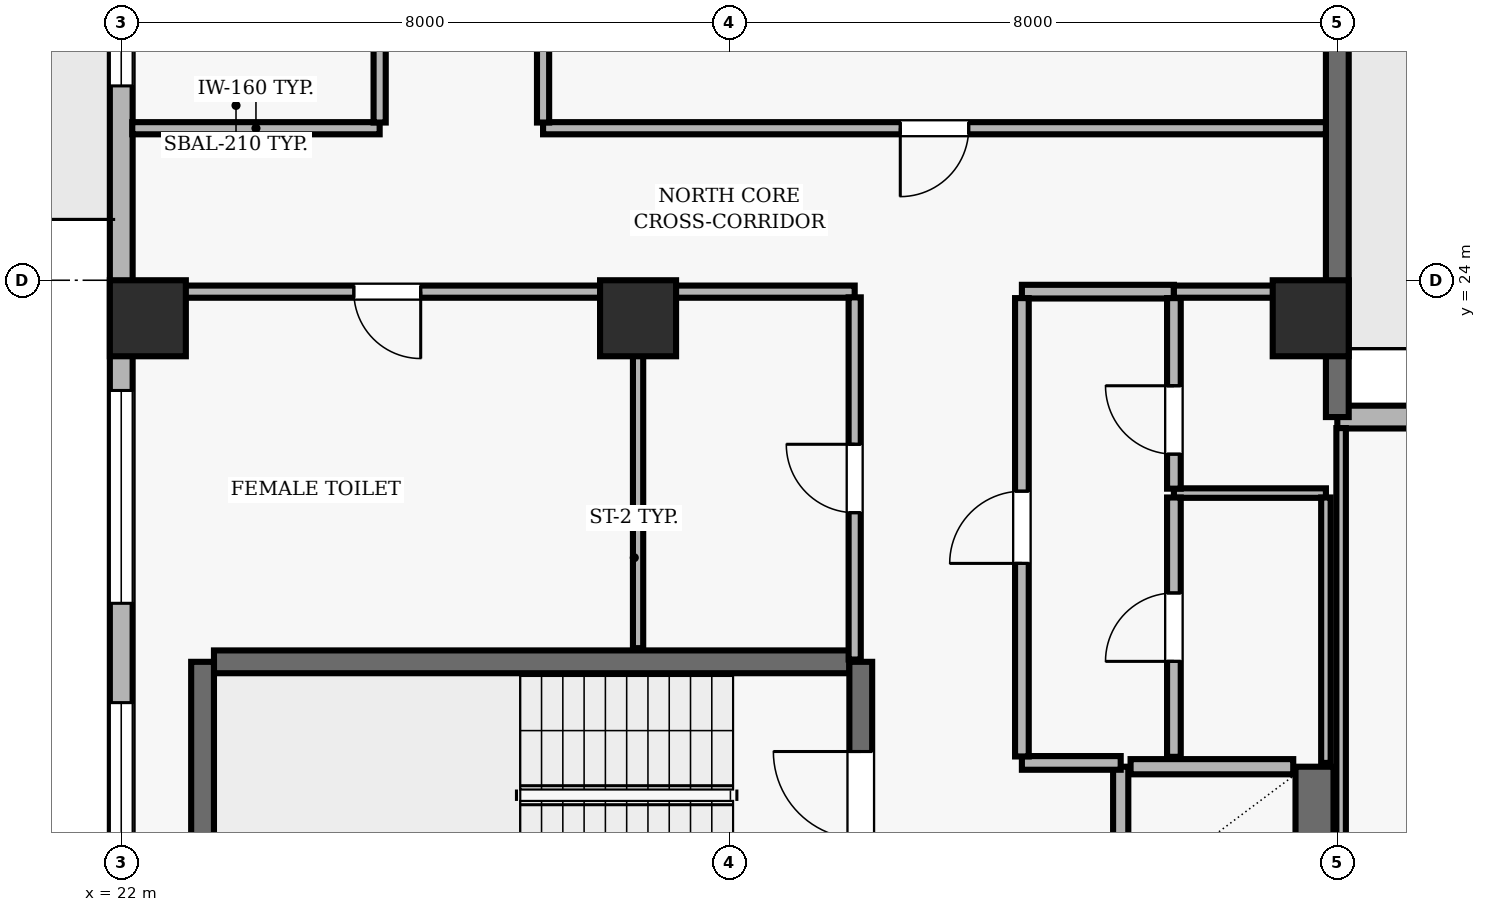
"""IFC4 building model, lengths in metres.
Left out: names, types, materials, properties, quantities, classifications, styles, units other than length and angle.
Written with IfcOpenShell. Run it as: python <this file> out.ifc"""

import sys

from ifc_helpers import new_model, si_unit, direction, frame, frame_2d, origin, origin_2d, place, context, subcontext, project, spatial, rectangle, extrude, element, fill, save


model = new_model("IFC4")
c1 = context("Model", 3, precision=1e-05, world=origin(), true_north=direction((0.0, 1.0)))
c2 = subcontext(c1, "Body", "Model", "MODEL_VIEW")
j1 = project(units=[si_unit("LENGTHUNIT", "METRE"), si_unit("PLANEANGLEUNIT", "RADIAN")], contexts=[c1])
p1 = place(None, origin())
s1 = spatial("IfcSite", under=j1, at=p1, CompositionType="ELEMENT")
p2 = place(p1, origin())
s2 = spatial("IfcBuilding", under=s1, at=p2, CompositionType="ELEMENT")
p3 = place(p2, frame((0.0, 0.0, 230.4)))
s3 = spatial("IfcBuildingStorey", under=s2, at=p3, CompositionType="ELEMENT", Elevation=230.4)
for number, where, z_axis, x_axis in (
    (1, (22.35, 23.5, 0.0), (0.0, 0.0, 1.0), (1.0, 0.0, 0.0)),
    (2, (28.8, 23.5, 0.0), (0.0, 0.0, 1.0), (1.0, 0.0, 0.0)),
    (3, (37.65, 23.5, 0.0), (0.0, 0.0, 1.0), (1.0, 0.0, 0.0)),
):
    element("IfcColumn", number, at=place(p3, frame(where, z_axis=z_axis, x_axis=x_axis)), inside=s3, PredefinedType="COLUMN", context=c2, shape_type="SweptSolid", body=[
        extrude(rectangle(XDim=1.0, YDim=1.0, at=origin_2d()), origin(), (0.0, 0.0, 1.0), 3.9),
    ])
p4 = place(p3, frame((42.4, 22.2, 0.0), z_axis=(0.0, 0.0, 1.0), x_axis=(-1.0, 0.0, 0.0)))
e4 = element("IfcWall", 4, at=p4, inside=s3, PredefinedType="SOLIDWALL", context=c2, shape_type="SweptSolid", body=[
    extrude(rectangle(XDim=4.4, YDim=0.3, at=frame_2d((2.2, 0.0))), origin(), (0.0, 0.0, 1.0), 3.69),
])
p5 = place(p3, frame((38.0, 22.2, 0.0), z_axis=(0.0, 0.0, 1.0), x_axis=(0.0, 1.0, 0.0)))
e5 = element("IfcWall", 5, at=p5, inside=s3, PredefinedType="SOLIDWALL", context=c2, shape_type="SweptSolid", body=[
    extrude(rectangle(XDim=18.5, YDim=0.3, at=frame_2d((9.25, 0.0))), origin(), (0.0, 0.0, 1.0), 3.69),
])
p6 = place(p5, frame((11.05, 0.0, 0.0)))
e6 = element("IfcOpeningElement", 6, at=p6, cuts=e5, PredefinedType="OPENING", context=c2, shape_type="SweptSolid", body=[
    extrude(rectangle(XDim=1.0, YDim=2.2, at=frame_2d((0.5, 1.1))), frame((0.0, 0.16, 0.0), z_axis=(0.0, -1.0, 0.0), x_axis=(1.0, 0.0, 0.0)), (0.0, 0.0, 1.0), 0.32),
])
p7 = place(p3, frame((22.0, 40.7, 0.0), z_axis=(0.0, 0.0, 1.0), x_axis=(0.0, -1.0, 0.0)))
e7 = element("IfcWall", 7, at=p7, inside=s3, PredefinedType="SOLIDWALL", context=c2, shape_type="SweptSolid", body=[
    extrude(rectangle(XDim=38.2, YDim=0.3, at=frame_2d((19.1, 0.0))), origin(), (0.0, 0.0, 1.0), 3.69),
])
p8 = place(p7, frame((6.7, 0.0, 0.0)))
e8 = element("IfcOpeningElement", 8, at=p8, cuts=e7, PredefinedType="OPENING", context=c2, shape_type="SweptSolid", body=[
    extrude(rectangle(XDim=1.0, YDim=2.2, at=frame_2d((0.5, 1.1))), frame((0.0, 0.16, 0.0), z_axis=(0.0, -1.0, 0.0), x_axis=(1.0, 0.0, 0.0)), (0.0, 0.0, 1.0), 0.32),
])
p9 = place(p7, frame((11.343, 0.0, 0.9)))
e9 = element("IfcOpeningElement", 9, at=p9, cuts=e7, PredefinedType="OPENING", context=c2, shape_type="SweptSolid", body=[
    extrude(rectangle(XDim=2.8, YDim=1.8, at=frame_2d((1.4, 0.9))), frame((0.0, 0.16, 0.0), z_axis=(0.0, -1.0, 0.0), x_axis=(1.0, 0.0, 0.0)), (0.0, 0.0, 1.0), 0.32),
])
p10 = place(p7, frame((18.15, 0.0, 0.9)))
e10 = element("IfcOpeningElement", 10, at=p10, cuts=e7, PredefinedType="OPENING", context=c2, shape_type="SweptSolid", body=[
    extrude(rectangle(XDim=2.8, YDim=1.8, at=frame_2d((1.4, 0.9))), frame((0.0, 0.16, 0.0), z_axis=(0.0, -1.0, 0.0), x_axis=(1.0, 0.0, 0.0)), (0.0, 0.0, 1.0), 0.32),
])
p11 = place(p7, frame((22.257, 0.0, 0.9)))
e11 = element("IfcOpeningElement", 11, at=p11, cuts=e7, PredefinedType="OPENING", context=c2, shape_type="SweptSolid", body=[
    extrude(rectangle(XDim=2.8, YDim=1.8, at=frame_2d((1.4, 0.9))), frame((0.0, 0.16, 0.0), z_axis=(0.0, -1.0, 0.0), x_axis=(1.0, 0.0, 0.0)), (0.0, 0.0, 1.0), 0.32),
])
p12 = place(p7, frame((28.614, 0.0, 0.9)))
e12 = element("IfcOpeningElement", 12, at=p12, cuts=e7, PredefinedType="OPENING", context=c2, shape_type="SweptSolid", body=[
    extrude(rectangle(XDim=2.8, YDim=1.8, at=frame_2d((1.4, 0.9))), frame((0.0, 0.16, 0.0), z_axis=(0.0, -1.0, 0.0), x_axis=(1.0, 0.0, 0.0)), (0.0, 0.0, 1.0), 0.32),
])
p13 = place(p3, frame((31.58, 18.98, 0.0), z_axis=(0.0, 0.0, 1.0), x_axis=(-1.0, 0.0, 0.0)))
e13 = element("IfcWall", 13, at=p13, inside=s3, PredefinedType="SHEAR", context=c2, shape_type="SweptSolid", body=[
    extrude(rectangle(XDim=8.36, YDim=0.3, at=frame_2d((4.18, 0.0))), origin(), (0.0, 0.0, 1.0), 3.69),
])
p14 = place(p3, frame((23.07, 18.98, 0.0), z_axis=(0.0, 0.0, 1.0), x_axis=(0.0, -1.0, 0.0)))
e14 = element("IfcWall", 14, at=p14, inside=s3, PredefinedType="SHEAR", context=c2, shape_type="SweptSolid", body=[
    extrude(rectangle(XDim=3.51, YDim=0.3, at=frame_2d((1.755, 0.0))), origin(), (0.0, 0.0, 1.0), 3.69),
])
p15 = place(p3, frame((31.73, 15.47, 0.0), z_axis=(0.0, 0.0, 1.0), x_axis=(0.0, 1.0, 0.0)))
e15 = element("IfcWall", 15, at=p15, inside=s3, PredefinedType="SHEAR", context=c2, shape_type="SweptSolid", body=[
    extrude(rectangle(XDim=3.51, YDim=0.3, at=frame_2d((1.755, 0.0))), origin(), (0.0, 0.0, 1.0), 3.69),
])
p16 = place(p15, frame((1.18, 0.0, 0.0)))
e16 = element("IfcOpeningElement", 16, at=p16, cuts=e15, PredefinedType="OPENING", context=c2, shape_type="SweptSolid", body=[
    extrude(rectangle(XDim=1.15, YDim=2.15, at=frame_2d((0.575, 1.075))), frame((0.0, 0.16, 0.0), z_axis=(0.0, -1.0, 0.0), x_axis=(1.0, 0.0, 0.0)), (0.0, 0.0, 1.0), 0.32),
])
p17 = place(p3, frame((35.15, 17.6, 0.0), z_axis=(0.0, 0.0, 1.0), x_axis=(0.0, -1.0, 0.0)))
e17 = element("IfcWall", 17, at=p17, inside=s3, PredefinedType="SOLIDWALL", context=c2, shape_type="SweptSolid", body=[
    extrude(rectangle(XDim=1.85, YDim=0.2, at=frame_2d((0.925, 0.0))), origin(), (0.0, 0.0, 1.0), 3.69),
])
p18 = place(p3, frame((37.7, 15.75, 0.0), z_axis=(0.0, 0.0, 1.0), x_axis=(0.0, 1.0, 0.0)))
e18 = element("IfcWall", 18, at=p18, inside=s3, PredefinedType="SHEAR", context=c2, shape_type="SweptSolid", body=[
    extrude(rectangle(XDim=1.85, YDim=0.5, at=frame_2d((0.925, 0.0))), origin(), (0.0, 0.0, 1.0), 3.69),
])
p19 = place(p3, frame((37.42, 17.6, 0.0), z_axis=(0.0, 0.0, 1.0), x_axis=(-1.0, 0.0, 0.0)))
e19 = element("IfcWall", 19, at=p19, inside=s3, PredefinedType="SOLIDWALL", context=c2, shape_type="SweptSolid", body=[
    extrude(rectangle(XDim=2.14, YDim=0.2, at=frame_2d((1.07, 0.0))), origin(), (0.0, 0.0, 1.0), 3.69),
])
p20 = place(p3, frame((25.4, 26.0, 0.0), z_axis=(0.0, 0.0, 1.0), x_axis=(-1.0, 0.0, 0.0)))
e20 = element("IfcWall", 20, at=p20, inside=s3, PredefinedType="PARTITIONING", context=c2, shape_type="SweptSolid", body=[
    extrude(rectangle(XDim=3.255, YDim=0.16, at=frame_2d((1.627, 0.0))), origin(), (0.0, 0.0, 1.0), 3.69),
])
p21 = place(p3, frame((28.8, 23.85, 0.0), z_axis=(0.0, 0.0, 1.0), x_axis=(-1.0, 0.0, 0.0)))
e21 = element("IfcWall", 21, at=p21, inside=s3, PredefinedType="PARTITIONING", context=c2, shape_type="SweptSolid", body=[
    extrude(rectangle(XDim=6.6, YDim=0.16, at=frame_2d((3.3, 0.0))), origin(), (0.0, 0.0, 1.0), 3.139),
])
p22 = place(p21, frame((2.86, 0.0, 0.0)))
e22 = element("IfcOpeningElement", 22, at=p22, cuts=e21, PredefinedType="OPENING", context=c2, shape_type="SweptSolid", body=[
    extrude(rectangle(XDim=0.88, YDim=2.1, at=frame_2d((0.44, 1.05))), frame((0.0, 0.09, 0.0), z_axis=(0.0, -1.0, 0.0), x_axis=(1.0, 0.0, 0.0)), (0.0, 0.0, 1.0), 0.18),
])
p23 = place(p3, frame((31.65, 23.85, 0.0), z_axis=(0.0, 0.0, 1.0), x_axis=(-1.0, 0.0, 0.0)))
e23 = element("IfcWall", 23, at=p23, inside=s3, PredefinedType="PARTITIONING", context=c2, shape_type="SweptSolid", body=[
    extrude(rectangle(XDim=2.85, YDim=0.16, at=frame_2d((1.425, 0.0))), origin(), (0.0, 0.0, 1.0), 3.139),
])
p24 = place(p3, frame((33.85, 17.65, 0.0), z_axis=(0.0, 0.0, 1.0), x_axis=(1.0, 0.0, 0.0)))
e24 = element("IfcWall", 24, at=p24, inside=s3, PredefinedType="PARTITIONING", context=c2, shape_type="SweptSolid", body=[
    extrude(rectangle(XDim=1.3, YDim=0.18, at=frame_2d((0.65, 0.0))), origin(), (0.0, 0.0, 1.0), 3.69),
])
p25 = place(p3, frame((35.85, 21.2, 0.0), z_axis=(0.0, 0.0, 1.0), x_axis=(1.0, 0.0, 0.0)))
e25 = element("IfcWall", 25, at=p25, inside=s3, PredefinedType="PARTITIONING", context=c2, shape_type="SweptSolid", body=[
    extrude(rectangle(XDim=2.0, YDim=0.125, at=frame_2d((1.0, 0.0))), origin(), (0.0, 0.0, 1.0), 3.69),
])
p26 = place(p3, frame((35.85, 23.85, 0.0), z_axis=(0.0, 0.0, 1.0), x_axis=(-1.0, 0.0, 0.0)))
e26 = element("IfcWall", 26, at=p26, inside=s3, PredefinedType="PARTITIONING", context=c2, shape_type="SweptSolid", body=[
    extrude(rectangle(XDim=2.0, YDim=0.18, at=frame_2d((1.0, 0.0))), origin(), (0.0, 0.0, 1.0), 3.139),
])
p27 = place(p3, frame((37.85, 23.85, 0.0), z_axis=(0.0, 0.0, 1.0), x_axis=(-1.0, 0.0, 0.0)))
e27 = element("IfcWall", 27, at=p27, inside=s3, PredefinedType="PARTITIONING", context=c2, shape_type="SweptSolid", body=[
    extrude(rectangle(XDim=2.0, YDim=0.16, at=frame_2d((1.0, 0.0))), origin(), (0.0, 0.0, 1.0), 3.139),
])
p28 = place(p3, frame((37.85, 26.0, 0.0), z_axis=(0.0, 0.0, 1.0), x_axis=(-1.0, 0.0, 0.0)))
e28 = element("IfcWall", 28, at=p28, inside=s3, PredefinedType="PARTITIONING", context=c2, shape_type="SweptSolid", body=[
    extrude(rectangle(XDim=10.3, YDim=0.16, at=frame_2d((5.15, 0.0))), origin(), (0.0, 0.0, 1.0), 3.69),
])
p29 = place(p28, frame((4.7, 0.0, 0.0)))
e29 = element("IfcOpeningElement", 29, at=p29, cuts=e28, PredefinedType="OPENING", context=c2, shape_type="SweptSolid", body=[
    extrude(rectangle(XDim=0.9, YDim=2.1, at=frame_2d((0.45, 1.05))), frame((0.0, 0.09, 0.0), z_axis=(0.0, -1.0, 0.0), x_axis=(1.0, 0.0, 0.0)), (0.0, 0.0, 1.0), 0.18),
])
p30 = place(p3, frame((25.4, 31.622, 0.0), z_axis=(0.0, 0.0, 1.0), x_axis=(0.0, -1.0, 0.0)))
e30 = element("IfcWall", 30, at=p30, inside=s3, PredefinedType="PARTITIONING", context=c2, shape_type="SweptSolid", body=[
    extrude(rectangle(XDim=5.547, YDim=0.16, at=frame_2d((2.773, 0.0))), origin(), (0.0, 0.0, 1.0), 3.69),
])
p31 = place(p30, frame((2.324, 0.0, 0.0)))
e31 = element("IfcOpeningElement", 31, at=p31, cuts=e30, PredefinedType="OPENING", context=c2, shape_type="SweptSolid", body=[
    extrude(rectangle(XDim=0.9, YDim=2.1, at=frame_2d((0.45, 1.05))), frame((0.0, 0.09, 0.0), z_axis=(0.0, -1.0, 0.0), x_axis=(1.0, 0.0, 0.0)), (0.0, 0.0, 1.0), 0.18),
])
p32 = place(p3, frame((27.55, 26.075, 0.0), z_axis=(0.0, 0.0, 1.0), x_axis=(0.0, 1.0, 0.0)))
e32 = element("IfcWall", 32, at=p32, inside=s3, PredefinedType="PARTITIONING", context=c2, shape_type="SweptSolid", body=[
    extrude(rectangle(XDim=5.547, YDim=0.16, at=frame_2d((2.773, 0.0))), origin(), (0.0, 0.0, 1.0), 3.69),
])
p33 = place(p3, frame((28.8, 23.775, 0.0), z_axis=(0.0, 0.0, 1.0), x_axis=(0.0, -1.0, 0.0)))
e33 = element("IfcWall", 33, at=p33, inside=s3, PredefinedType="PARTITIONING", context=c2, shape_type="SweptSolid", body=[
    extrude(rectangle(XDim=4.615, YDim=0.135, at=frame_2d((2.308, 0.0))), origin(), (0.0, 0.0, 1.0), 3.69),
])
p34 = place(p3, frame((31.65, 19.01, 0.0), z_axis=(0.0, 0.0, 1.0), x_axis=(0.0, 1.0, 0.0)))
e34 = element("IfcWall", 34, at=p34, inside=s3, PredefinedType="PARTITIONING", context=c2, shape_type="SweptSolid", body=[
    extrude(rectangle(XDim=4.765, YDim=0.16, at=frame_2d((2.382, 0.0))), origin(), (0.0, 0.0, 1.0), 3.69),
])
p35 = place(p34, frame((1.932, 0.0, 0.0)))
e35 = element("IfcOpeningElement", 35, at=p35, cuts=e34, PredefinedType="OPENING", context=c2, shape_type="SweptSolid", body=[
    extrude(rectangle(XDim=0.9, YDim=2.1, at=frame_2d((0.45, 1.05))), frame((0.0, 0.09, 0.0), z_axis=(0.0, -1.0, 0.0), x_axis=(1.0, 0.0, 0.0)), (0.0, 0.0, 1.0), 0.18),
])
p36 = place(p3, frame((33.85, 17.735, 0.0), z_axis=(0.0, 0.0, 1.0), x_axis=(0.0, 1.0, 0.0)))
e36 = element("IfcWall", 36, at=p36, inside=s3, PredefinedType="PARTITIONING", context=c2, shape_type="SweptSolid", body=[
    extrude(rectangle(XDim=6.03, YDim=0.18, at=frame_2d((3.015, 0.0))), origin(), (0.0, 0.0, 1.0), 3.69),
])
p37 = place(p36, frame((2.54, 0.0, 0.0)))
e37 = element("IfcOpeningElement", 37, at=p37, cuts=e36, PredefinedType="OPENING", context=c2, shape_type="SweptSolid", body=[
    extrude(rectangle(XDim=0.95, YDim=2.1, at=frame_2d((0.475, 1.05))), frame((0.0, 0.1, 0.0), z_axis=(0.0, -1.0, 0.0), x_axis=(1.0, 0.0, 0.0)), (0.0, 0.0, 1.0), 0.2),
])
p38 = place(p3, frame((35.85, 17.73, 0.0), z_axis=(0.0, 0.0, 1.0), x_axis=(0.0, 1.0, 0.0)))
e38 = element("IfcWall", 38, at=p38, inside=s3, PredefinedType="PARTITIONING", context=c2, shape_type="SweptSolid", body=[
    extrude(rectangle(XDim=3.412, YDim=0.18, at=frame_2d((1.706, 0.0))), origin(), (0.0, 0.0, 1.0), 3.69),
])
p39 = place(p38, frame((1.256, 0.0, 0.0)))
e39 = element("IfcOpeningElement", 39, at=p39, cuts=e38, PredefinedType="OPENING", context=c2, shape_type="SweptSolid", body=[
    extrude(rectangle(XDim=0.9, YDim=2.1, at=frame_2d((0.45, 1.05))), frame((0.0, 0.1, 0.0), z_axis=(0.0, -1.0, 0.0), x_axis=(1.0, 0.0, 0.0)), (0.0, 0.0, 1.0), 0.2),
])
p40 = place(p3, frame((35.85, 21.258, 0.0), z_axis=(0.0, 0.0, 1.0), x_axis=(0.0, 1.0, 0.0)))
e40 = element("IfcWall", 40, at=p40, inside=s3, PredefinedType="PARTITIONING", context=c2, shape_type="SweptSolid", body=[
    extrude(rectangle(XDim=2.507, YDim=0.18, at=frame_2d((1.253, 0.0))), origin(), (0.0, 0.0, 1.0), 3.69),
])
p41 = place(p40, frame((0.454, 0.0, 0.0)))
e41 = element("IfcOpeningElement", 41, at=p41, cuts=e40, PredefinedType="OPENING", context=c2, shape_type="SweptSolid", body=[
    extrude(rectangle(XDim=0.9, YDim=2.1, at=frame_2d((0.45, 1.05))), frame((0.0, 0.1, 0.0), z_axis=(0.0, -1.0, 0.0), x_axis=(1.0, 0.0, 0.0)), (0.0, 0.0, 1.0), 0.2),
])
p42 = place(p3, frame((37.85, 17.65, 0.0), z_axis=(0.0, 0.0, 1.0), x_axis=(0.0, 1.0, 0.0)))
e42 = element("IfcWall", 42, at=p42, inside=s3, PredefinedType="PARTITIONING", context=c2, shape_type="SweptSolid", body=[
    extrude(rectangle(XDim=3.492, YDim=0.125, at=frame_2d((1.746, 0.0))), origin(), (0.0, 0.0, 1.0), 3.139),
])
p43 = place(p3, frame((38.05, 22.055, 0.0), z_axis=(0.0, 0.0, 1.0), x_axis=(0.0, -1.0, 0.0)))
e43 = element("IfcWall", 43, at=p43, inside=s3, PredefinedType="PARTITIONING", context=c2, shape_type="SweptSolid", body=[
    extrude(rectangle(XDim=5.98, YDim=0.125, at=frame_2d((2.99, 0.0))), origin(), (0.0, 0.0, 1.0), 3.139),
])
p44 = place(p9, origin())
e44 = element("IfcWindow", 44, at=p44, inside=s3, PartitioningType="SINGLE_PANEL", PredefinedType="WINDOW", context=c2, shape_type="SweptSolid", body=[
    extrude(rectangle(XDim=2.8, YDim=1.8, at=frame_2d((1.4, 0.9))), frame((0.0, 0.03, 0.0), z_axis=(0.0, -1.0, 0.0), x_axis=(1.0, 0.0, 0.0)), (0.0, 0.0, 1.0), 0.06),
])
fill(e9, e44)
p45 = place(p10, origin())
e45 = element("IfcWindow", 45, at=p45, inside=s3, PartitioningType="SINGLE_PANEL", PredefinedType="WINDOW", context=c2, shape_type="SweptSolid", body=[
    extrude(rectangle(XDim=2.8, YDim=1.8, at=frame_2d((1.4, 0.9))), frame((0.0, 0.03, 0.0), z_axis=(0.0, -1.0, 0.0), x_axis=(1.0, 0.0, 0.0)), (0.0, 0.0, 1.0), 0.06),
])
fill(e10, e45)
p46 = place(p11, origin())
e46 = element("IfcWindow", 46, at=p46, inside=s3, PartitioningType="SINGLE_PANEL", PredefinedType="WINDOW", context=c2, shape_type="SweptSolid", body=[
    extrude(rectangle(XDim=2.8, YDim=1.8, at=frame_2d((1.4, 0.9))), frame((0.0, 0.03, 0.0), z_axis=(0.0, -1.0, 0.0), x_axis=(1.0, 0.0, 0.0)), (0.0, 0.0, 1.0), 0.06),
])
fill(e11, e46)
p47 = place(p16, origin())
e47 = element("IfcDoor", 47, at=p47, inside=s3, OperationType="SINGLE_SWING_RIGHT", PredefinedType="DOOR", context=c2, shape_type="SweptSolid", body=[
    extrude(rectangle(XDim=1.15, YDim=2.15, at=frame_2d((0.575, 1.075))), frame((0.0, 0.025, 0.0), z_axis=(0.0, -1.0, 0.0), x_axis=(1.0, 0.0, 0.0)), (0.0, 0.0, 1.0), 0.05),
])
fill(e16, e47)
p48 = place(p37, origin())
e48 = element("IfcDoor", 48, at=p48, inside=s3, OperationType="SINGLE_SWING_LEFT", PredefinedType="DOOR", context=c2, shape_type="SweptSolid", body=[
    extrude(rectangle(XDim=0.95, YDim=2.1, at=frame_2d((0.475, 1.05))), frame((0.0, 0.025, 0.0), z_axis=(0.0, -1.0, 0.0), x_axis=(1.0, 0.0, 0.0)), (0.0, 0.0, 1.0), 0.05),
])
fill(e37, e48)
p49 = place(p41, origin())
e49 = element("IfcDoor", 49, at=p49, inside=s3, OperationType="SINGLE_SWING_RIGHT", PredefinedType="DOOR", context=c2, shape_type="SweptSolid", body=[
    extrude(rectangle(XDim=0.9, YDim=2.1, at=frame_2d((0.45, 1.05))), frame((0.0, 0.025, 0.0), z_axis=(0.0, -1.0, 0.0), x_axis=(1.0, 0.0, 0.0)), (0.0, 0.0, 1.0), 0.05),
])
fill(e41, e49)
p50 = place(p39, origin())
e50 = element("IfcDoor", 50, at=p50, inside=s3, OperationType="SINGLE_SWING_LEFT", PredefinedType="DOOR", context=c2, shape_type="SweptSolid", body=[
    extrude(rectangle(XDim=0.9, YDim=2.1, at=frame_2d((0.45, 1.05))), frame((0.0, 0.025, 0.0), z_axis=(0.0, -1.0, 0.0), x_axis=(1.0, 0.0, 0.0)), (0.0, 0.0, 1.0), 0.05),
])
fill(e39, e50)
p51 = place(p35, origin())
e51 = element("IfcDoor", 51, at=p51, inside=s3, OperationType="SINGLE_SWING_RIGHT", PredefinedType="DOOR", context=c2, shape_type="SweptSolid", body=[
    extrude(rectangle(XDim=0.9, YDim=2.1, at=frame_2d((0.45, 1.05))), frame((0.0, 0.025, 0.0), z_axis=(0.0, -1.0, 0.0), x_axis=(1.0, 0.0, 0.0)), (0.0, 0.0, 1.0), 0.05),
])
fill(e35, e51)
p52 = place(p22, origin())
e52 = element("IfcDoor", 52, at=p52, inside=s3, OperationType="SINGLE_SWING_LEFT", PredefinedType="DOOR", context=c2, shape_type="SweptSolid", body=[
    extrude(rectangle(XDim=0.88, YDim=2.1, at=frame_2d((0.44, 1.05))), frame((0.0, 0.025, 0.0), z_axis=(0.0, -1.0, 0.0), x_axis=(1.0, 0.0, 0.0)), (0.0, 0.0, 1.0), 0.05),
])
fill(e22, e52)
p53 = place(p29, origin())
e53 = element("IfcDoor", 53, at=p53, inside=s3, OperationType="SINGLE_SWING_RIGHT", PredefinedType="DOOR", context=c2, shape_type="SweptSolid", body=[
    extrude(rectangle(XDim=0.9, YDim=2.1, at=frame_2d((0.45, 1.05))), frame((0.0, 0.025, 0.0), z_axis=(0.0, -1.0, 0.0), x_axis=(1.0, 0.0, 0.0)), (0.0, 0.0, 1.0), 0.05),
])
fill(e29, e53)
save(model, sys.argv[1])
